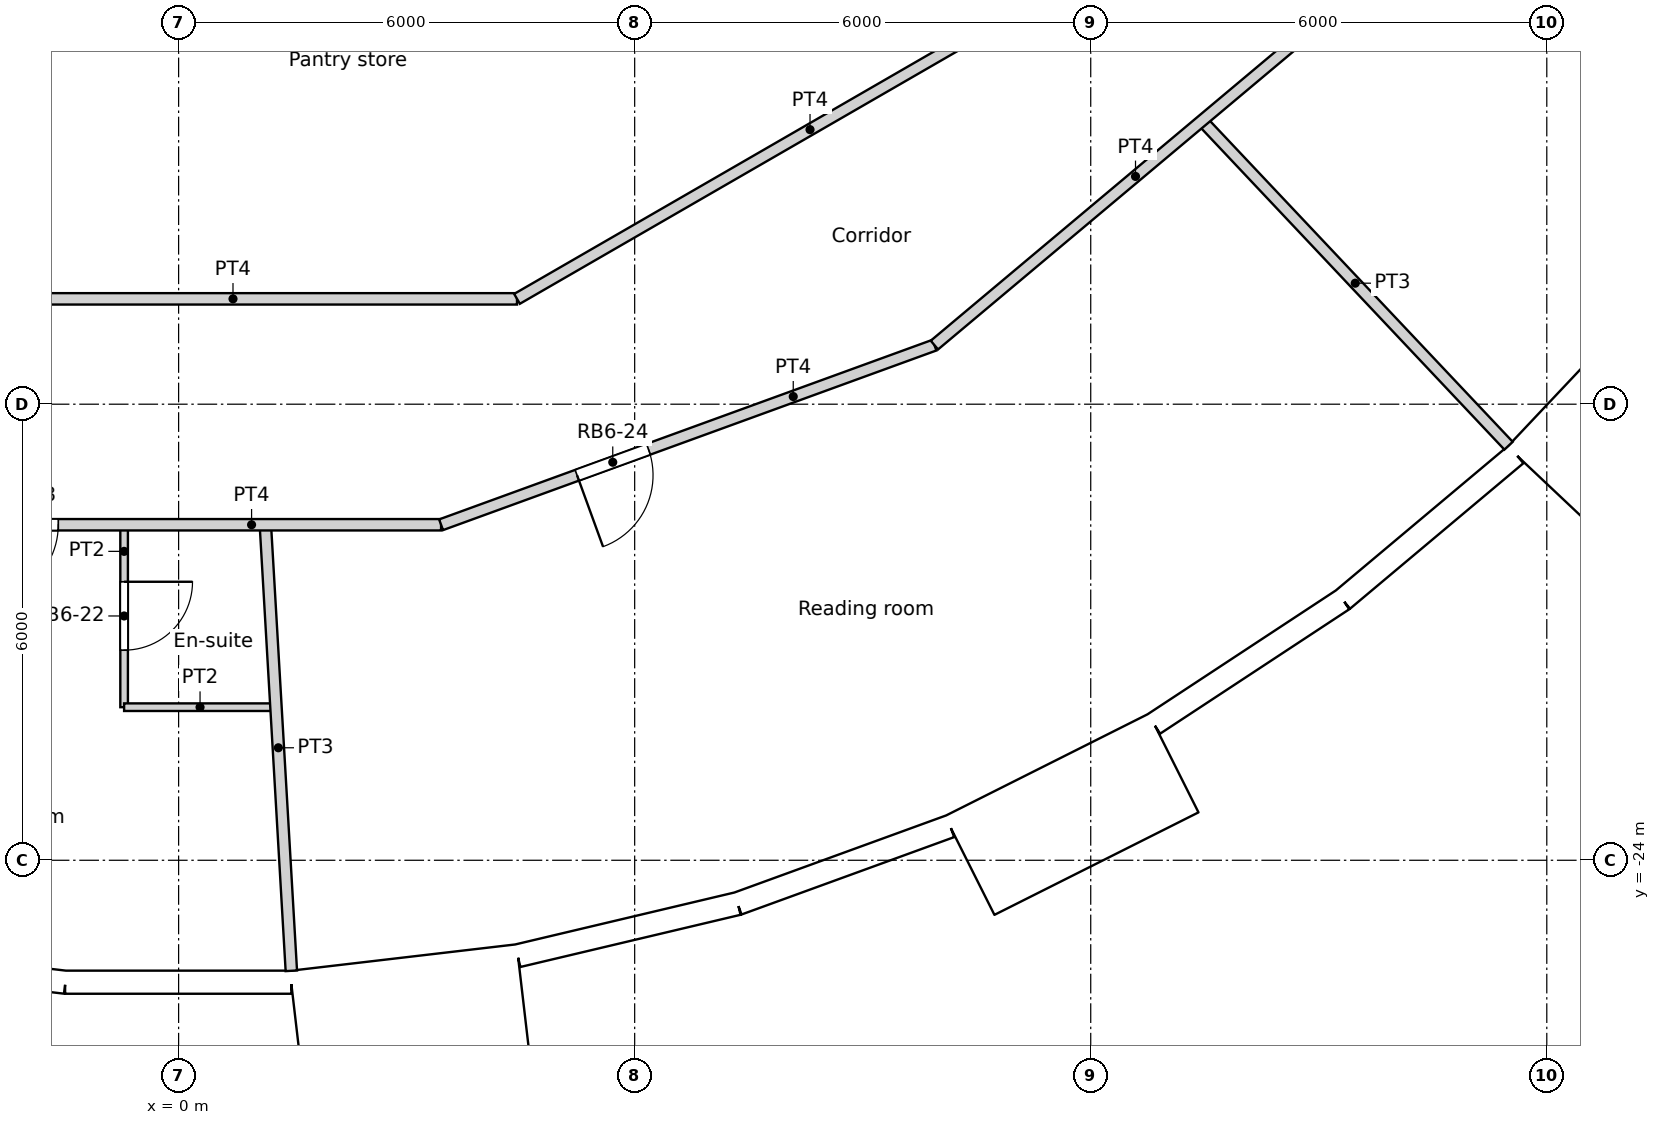
"""IFC4 building model, lengths in metres.
Left out: names, types, materials, properties, quantities, classifications, styles, units other than length and angle.
Written with IfcOpenShell. Run it as: python <this file> out.ifc"""

import sys

from ifc_helpers import new_model, si_unit, direction, frame, frame_2d, origin, origin_2d, place, context, subcontext, project, spatial, rectangle, circle, extrude, element, fill, save


model = new_model("IFC4")
c1 = context("Model", 3, precision=1e-05, world=origin(), true_north=direction((0.0, 1.0)))
c2 = subcontext(c1, "Body", "Model", "MODEL_VIEW")
j1 = project(units=[si_unit("LENGTHUNIT", "METRE"), si_unit("PLANEANGLEUNIT", "RADIAN")], contexts=[c1])
p1 = place(None, origin())
s1 = spatial("IfcSite", under=j1, at=p1, CompositionType="ELEMENT")
p2 = place(p1, origin())
s2 = spatial("IfcBuilding", under=s1, at=p2, CompositionType="ELEMENT")
p3 = place(p2, frame((0.0, 0.0, 180.0)))
s3 = spatial("IfcBuildingStorey", under=s2, at=p3, CompositionType="ELEMENT", Elevation=180.0)
for number, where, z_axis, x_axis in (
    (1, (-1.427, -24.506, 0.0), (0.0, 0.0, 1.0), (1.0, 0.0, 0.0)),
    (2, (4.263, -24.175, 0.0), (0.0, 0.0, 1.0), (1.0, 0.0, 0.0)),
    (3, (9.723, -22.54, 0.0), (0.0, 0.0, 1.0), (1.0, 0.0, 0.0)),
    (4, (14.659, -19.69, 0.0), (0.0, 0.0, 1.0), (1.0, 0.0, 0.0)),
    (5, (18.805, -15.779, 0.0), (0.0, 0.0, 1.0), (1.0, 0.0, 0.0)),
):
    element("IfcColumn", number, at=place(p3, frame(where, z_axis=z_axis, x_axis=x_axis)), inside=s3, PredefinedType="COLUMN", context=c2, shape_type="SweptSolid", body=[
        extrude(circle(Radius=0.6, at=origin_2d()), origin(), (0.0, 0.0, 1.0), 3.6),
    ])
for number, where, z_axis, x_axis in (
    (6, (1.406, -18.77, 0.0), (0.0, 0.0, 1.0), (1.0, 0.0, 0.0)),
    (7, (6.876, -17.521, 0.0), (0.0, 0.0, 1.0), (1.0, 0.0, 0.0)),
    (8, (11.735, -14.716, 0.0), (0.0, 0.0, 1.0), (1.0, 0.0, 0.0)),
):
    element("IfcColumn", number, at=place(p3, frame(where, z_axis=z_axis, x_axis=x_axis)), inside=s3, PredefinedType="COLUMN", context=c2, shape_type="SweptSolid", body=[
        extrude(circle(Radius=0.65, at=origin_2d()), origin(), (0.0, 0.0, 1.0), 3.6),
    ])
p4 = place(p3, frame((-4.444, -25.259, 0.0), z_axis=(0.0, 0.0, 1.0), x_axis=(0.993245010522, -0.1160359818, 0.0)))
e9 = element("IfcWall", 9, at=p4, inside=s3, PredefinedType="SOLIDWALL", context=c2, shape_type="SweptSolid", body=[
    extrude(rectangle(XDim=2.973, YDim=0.3, at=frame_2d((1.486, 0.0))), origin(), (0.0, 0.0, 1.0), 3.3),
])
p5 = place(p4, frame((1.486, 0.0, 1.55)))
e10 = element("IfcOpeningElement", 10, at=p5, cuts=e9, PredefinedType="OPENING", context=c2, shape_type="SweptSolid", body=[
    extrude(circle(Radius=0.9, at=origin_2d()), frame((0.0, 0.16, 0.0), z_axis=(0.0, -1.0, 0.0), x_axis=(1.0, 0.0, 0.0)), (0.0, 0.0, 1.0), 0.32),
])
p6 = place(p3, frame((-1.491, -25.604, 0.0), z_axis=(0.0, 0.0, 1.0), x_axis=(1.0, 0.0, 0.0)))
e11 = element("IfcWall", 11, at=p6, inside=s3, PredefinedType="SOLIDWALL", context=c2, shape_type="SweptSolid", body=[
    extrude(rectangle(XDim=2.973, YDim=0.3, at=frame_2d((1.486, 0.0))), origin(), (0.0, 0.0, 1.0), 3.3),
])
p7 = place(p6, frame((1.486, 0.0, 1.55)))
e12 = element("IfcOpeningElement", 12, at=p7, cuts=e11, PredefinedType="OPENING", context=c2, shape_type="SweptSolid", body=[
    extrude(circle(Radius=0.9, at=origin_2d()), frame((0.0, 0.16, 0.0), z_axis=(0.0, -1.0, 0.0), x_axis=(1.0, 0.0, 0.0)), (0.0, 0.0, 1.0), 0.32),
])
p8 = place(p3, frame((1.549, -26.176, -0.3), z_axis=(0.0, 0.0, 1.0), x_axis=(0.9932342274, 0.116128246006, 0.0)))
e13 = element("IfcWall", 13, at=p8, inside=s3, PredefinedType="ELEMENTEDWALL", context=c2, shape_type="SweptSolid", body=[
    extrude(rectangle(XDim=3.0, YDim=1.45, at=frame_2d((1.5, 0.0))), origin(), (0.0, 0.0, 1.0), 3.6),
])
p9 = place(p8, frame((1.5, 0.0, 1.85)))
e14 = element("IfcOpeningElement", 14, at=p9, cuts=e13, PredefinedType="OPENING", context=c2, shape_type="SweptSolid", body=[
    extrude(circle(Radius=0.9, at=origin_2d()), frame((0.0, 0.735, 0.0), z_axis=(0.0, -1.0, 0.0), x_axis=(1.0, 0.0, 0.0)), (0.0, 0.0, 1.0), 1.47),
])
p10 = place(p3, frame((4.463, -25.256, 0.0), z_axis=(0.0, 0.0, 1.0), x_axis=(0.973045378923, 0.230613725862, 0.0)))
e15 = element("IfcWall", 15, at=p10, inside=s3, PredefinedType="SOLIDWALL", context=c2, shape_type="SweptSolid", body=[
    extrude(rectangle(XDim=2.973, YDim=0.3, at=frame_2d((1.486, 0.0))), origin(), (0.0, 0.0, 1.0), 3.3),
])
p11 = place(p10, frame((1.486, 0.0, 1.55)))
e16 = element("IfcOpeningElement", 16, at=p11, cuts=e15, PredefinedType="OPENING", context=c2, shape_type="SweptSolid", body=[
    extrude(circle(Radius=0.9, at=origin_2d()), frame((0.0, 0.16, 0.0), z_axis=(0.0, -1.0, 0.0), x_axis=(1.0, 0.0, 0.0)), (0.0, 0.0, 1.0), 0.32),
])
p12 = place(p3, frame((7.356, -24.57, 0.0), z_axis=(0.0, 0.0, 1.0), x_axis=(0.939690282133, 0.342026568652, 0.0)))
e17 = element("IfcWall", 17, at=p12, inside=s3, PredefinedType="SOLIDWALL", context=c2, shape_type="SweptSolid", body=[
    extrude(rectangle(XDim=2.973, YDim=0.3, at=frame_2d((1.486, 0.0))), origin(), (0.0, 0.0, 1.0), 3.3),
])
p13 = place(p12, frame((1.486, 0.0, 1.55)))
e18 = element("IfcOpeningElement", 18, at=p13, cuts=e17, PredefinedType="OPENING", context=c2, shape_type="SweptSolid", body=[
    extrude(circle(Radius=0.9, at=origin_2d()), frame((0.0, 0.16, 0.0), z_axis=(0.0, -1.0, 0.0), x_axis=(1.0, 0.0, 0.0)), (0.0, 0.0, 1.0), 0.32),
])
p14 = place(p3, frame((10.409, -24.068, -0.3), z_axis=(0.0, 0.0, 1.0), x_axis=(0.893628249713, 0.448807922518, 0.0)))
e19 = element("IfcWall", 19, at=p14, inside=s3, PredefinedType="ELEMENTEDWALL", context=c2, shape_type="SweptSolid", body=[
    extrude(rectangle(XDim=3.0, YDim=1.45, at=frame_2d((1.5, 0.0))), origin(), (0.0, 0.0, 1.0), 3.6),
])
p15 = place(p14, frame((1.5, 0.0, 1.85)))
e20 = element("IfcOpeningElement", 20, at=p15, cuts=e19, PredefinedType="OPENING", context=c2, shape_type="SweptSolid", body=[
    extrude(circle(Radius=0.9, at=origin_2d()), frame((0.0, 0.735, 0.0), z_axis=(0.0, -1.0, 0.0), x_axis=(1.0, 0.0, 0.0)), (0.0, 0.0, 1.0), 1.47),
])
p16 = place(p3, frame((12.832, -22.206, 0.0), z_axis=(0.0, 0.0, 1.0), x_axis=(0.835508361394, 0.54947773207, 0.0)))
e21 = element("IfcWall", 21, at=p16, inside=s3, PredefinedType="SOLIDWALL", context=c2, shape_type="SweptSolid", body=[
    extrude(rectangle(XDim=2.973, YDim=0.3, at=frame_2d((1.486, 0.0))), origin(), (0.0, 0.0, 1.0), 3.3),
])
p17 = place(p16, frame((1.486, 0.0, 1.55)))
e22 = element("IfcOpeningElement", 22, at=p17, cuts=e21, PredefinedType="OPENING", context=c2, shape_type="SweptSolid", body=[
    extrude(circle(Radius=0.9, at=origin_2d()), frame((0.0, 0.16, 0.0), z_axis=(0.0, -1.0, 0.0), x_axis=(1.0, 0.0, 0.0)), (0.0, 0.0, 1.0), 0.32),
])
p18 = place(p3, frame((15.316, -20.573, 0.0), z_axis=(0.0, 0.0, 1.0), x_axis=(0.766008913364, 0.642829950023, 0.0)))
e23 = element("IfcWall", 23, at=p18, inside=s3, PredefinedType="SOLIDWALL", context=c2, shape_type="SweptSolid", body=[
    extrude(rectangle(XDim=2.973, YDim=0.3, at=frame_2d((1.486, 0.0))), origin(), (0.0, 0.0, 1.0), 3.3),
])
p19 = place(p18, frame((1.486, 0.0, 1.55)))
e24 = element("IfcOpeningElement", 24, at=p19, cuts=e23, PredefinedType="OPENING", context=c2, shape_type="SweptSolid", body=[
    extrude(circle(Radius=0.9, at=origin_2d()), frame((0.0, 0.16, 0.0), z_axis=(0.0, -1.0, 0.0), x_axis=(1.0, 0.0, 0.0)), (0.0, 0.0, 1.0), 0.32),
])
p20 = place(p3, frame((18.013, -19.056, -0.3), z_axis=(0.0, 0.0, 1.0), x_axis=(0.686217177108, 0.727396718334, 0.0)))
e25 = element("IfcWall", 25, at=p20, inside=s3, PredefinedType="ELEMENTEDWALL", context=c2, shape_type="SweptSolid", body=[
    extrude(rectangle(XDim=3.0, YDim=1.45, at=frame_2d((1.5, 0.0))), origin(), (0.0, 0.0, 1.0), 3.6),
])
p21 = place(p20, frame((1.5, 0.0, 1.85)))
e26 = element("IfcOpeningElement", 26, at=p21, cuts=e25, PredefinedType="OPENING", context=c2, shape_type="SweptSolid", body=[
    extrude(circle(Radius=0.9, at=origin_2d()), frame((0.0, 0.735, 0.0), z_axis=(0.0, -1.0, 0.0), x_axis=(1.0, 0.0, 0.0)), (0.0, 0.0, 1.0), 1.47),
])
p22 = place(p3, frame((9.943, -17.222, 0.0), z_axis=(0.0, 0.0, 1.0), x_axis=(0.766192104565, 0.642611592567, 0.0)))
e27 = element("IfcWall", 27, at=p22, inside=s3, PredefinedType="PARTITIONING", context=c2, shape_type="SweptSolid", body=[
    extrude(rectangle(XDim=6.906, YDim=0.15, at=frame_2d((3.453, 0.0))), origin(), (0.0, 0.0, 1.0), 3.3),
])
p23 = place(p3, frame((-3.021, -16.614, 0.0), z_axis=(0.0, 0.0, 1.0), x_axis=(1.0, 0.0, 0.0)))
e28 = element("IfcWall", 28, at=p23, inside=s3, PredefinedType="PARTITIONING", context=c2, shape_type="SweptSolid", body=[
    extrude(rectangle(XDim=7.473, YDim=0.15, at=frame_2d((3.736, 0.0))), origin(), (0.0, 0.0, 1.0), 3.3),
])
p24 = place(p3, frame((4.452, -16.614, 0.0), z_axis=(0.0, 0.0, 1.0), x_axis=(0.866005203721, 0.500034985904, 0.0)))
e29 = element("IfcWall", 29, at=p24, inside=s3, PredefinedType="PARTITIONING", context=c2, shape_type="SweptSolid", body=[
    extrude(rectangle(XDim=8.903, YDim=0.15, at=frame_2d((4.452, 0.0))), origin(), (0.0, 0.0, 1.0), 3.3),
])
p25 = place(p3, frame((-3.453, -19.586, 0.0), z_axis=(0.0, 0.0, 1.0), x_axis=(1.0, 0.0, 0.0)))
e30 = element("IfcWall", 30, at=p25, inside=s3, PredefinedType="PARTITIONING", context=c2, shape_type="SweptSolid", body=[
    extrude(rectangle(XDim=6.906, YDim=0.15, at=frame_2d((3.453, 0.0))), origin(), (0.0, 0.0, 1.0), 3.3),
])
p26 = place(p25, frame((0.87, 0.0, 0.0)))
e31 = element("IfcOpeningElement", 31, at=p26, cuts=e30, PredefinedType="OPENING", context=c2, shape_type="SweptSolid", body=[
    extrude(rectangle(XDim=1.0, YDim=2.1, at=frame_2d((0.5, 1.05))), frame((0.0, 0.075, 0.0), z_axis=(0.0, -1.0, 0.0), x_axis=(1.0, 0.0, 0.0)), (0.0, 0.0, 1.0), 0.15),
])
p27 = place(p3, frame((3.453, -19.586, 0.0), z_axis=(0.0, 0.0, 1.0), x_axis=(0.939672634566, 0.342075050021, 0.0)))
e32 = element("IfcWall", 32, at=p27, inside=s3, PredefinedType="PARTITIONING", context=c2, shape_type="SweptSolid", body=[
    extrude(rectangle(XDim=6.908, YDim=0.15, at=frame_2d((3.454, 0.0))), origin(), (0.0, 0.0, 1.0), 3.3),
])
p28 = place(p27, frame((1.904, 0.0, 0.0)))
e33 = element("IfcOpeningElement", 33, at=p28, cuts=e32, PredefinedType="OPENING", context=c2, shape_type="SweptSolid", body=[
    extrude(rectangle(XDim=1.0, YDim=2.04, at=frame_2d((0.5, 1.02))), frame((0.0, 0.075, 0.0), z_axis=(0.0, -1.0, 0.0), x_axis=(1.0, 0.0, 0.0)), (0.0, 0.0, 1.0), 0.15),
])
p29 = place(p3, frame((-0.717, -21.986, 0.0), z_axis=(0.0, 0.0, 1.0), x_axis=(0.0, 1.0, 0.0)))
e34 = element("IfcWall", 34, at=p29, inside=s3, PredefinedType="PARTITIONING", context=c2, shape_type="SweptSolid", body=[
    extrude(rectangle(XDim=2.4, YDim=0.1, at=frame_2d((1.2, 0.0))), origin(), (0.0, 0.0, 1.0), 3.3),
])
p30 = place(p29, frame((0.75, 0.0, 0.0)))
e35 = element("IfcOpeningElement", 35, at=p30, cuts=e34, PredefinedType="OPENING", context=c2, shape_type="SweptSolid", body=[
    extrude(rectangle(XDim=0.9, YDim=2.04, at=frame_2d((0.45, 1.02))), frame((0.0, 0.05, 0.0), z_axis=(0.0, -1.0, 0.0), x_axis=(1.0, 0.0, 0.0)), (0.0, 0.0, 1.0), 0.1),
])
p31 = place(p3, frame((-0.717, -21.986, 0.0), z_axis=(0.0, 0.0, 1.0), x_axis=(1.0, 0.0, 0.0)))
e36 = element("IfcWall", 36, at=p31, inside=s3, PredefinedType="PARTITIONING", context=c2, shape_type="SweptSolid", body=[
    extrude(rectangle(XDim=1.998, YDim=0.1, at=frame_2d((0.999, 0.0))), origin(), (0.0, 0.0, 1.0), 3.3),
])
p32 = place(p3, frame((1.141, -19.586, 0.0), z_axis=(0.0, 0.0, 1.0), x_axis=(0.058147412668, -0.998308007781, 0.0)))
e37 = element("IfcWall", 37, at=p32, inside=s3, PredefinedType="PARTITIONING", context=c2, shape_type="SweptSolid", body=[
    extrude(rectangle(XDim=5.878, YDim=0.15, at=frame_2d((2.939, 0.0))), origin(), (0.0, 0.0, 1.0), 3.3),
])
p33 = place(p3, frame((13.463, -14.27, 0.0), z_axis=(0.0, 0.0, 1.0), x_axis=(0.6862502776, -0.72736549031, 0.0)))
e38 = element("IfcWall", 38, at=p33, inside=s3, PredefinedType="PARTITIONING", context=c2, shape_type="SweptSolid", body=[
    extrude(rectangle(XDim=5.879, YDim=0.15, at=frame_2d((2.939, 0.0))), origin(), (0.0, 0.0, 1.0), 3.3),
])
p34 = place(p7, origin())
e39 = element("IfcWindow", 39, at=p34, inside=s3, PartitioningType="SINGLE_PANEL", PredefinedType="WINDOW", context=c2, shape_type="SweptSolid", body=[
    extrude(circle(Radius=0.9, at=origin_2d()), frame((0.0, 0.12, 0.0), z_axis=(0.0, -1.0, 0.0), x_axis=(1.0, 0.0, 0.0)), (0.0, 0.0, 1.0), 0.1),
])
fill(e12, e39)
p35 = place(p9, origin())
e40 = element("IfcWindow", 40, at=p35, inside=s3, PartitioningType="SINGLE_PANEL", PredefinedType="WINDOW", context=c2, shape_type="SweptSolid", body=[
    extrude(circle(Radius=0.9, at=origin_2d()), frame((0.0, 0.695, 0.0), z_axis=(0.0, -1.0, 0.0), x_axis=(1.0, 0.0, 0.0)), (0.0, 0.0, 1.0), 0.1),
])
fill(e14, e40)
p36 = place(p11, origin())
e41 = element("IfcWindow", 41, at=p36, inside=s3, PartitioningType="SINGLE_PANEL", PredefinedType="WINDOW", context=c2, shape_type="SweptSolid", body=[
    extrude(circle(Radius=0.9, at=origin_2d()), frame((0.0, 0.12, 0.0), z_axis=(0.0, -1.0, 0.0), x_axis=(1.0, 0.0, 0.0)), (0.0, 0.0, 1.0), 0.1),
])
fill(e16, e41)
p37 = place(p13, origin())
e42 = element("IfcWindow", 42, at=p37, inside=s3, PartitioningType="SINGLE_PANEL", PredefinedType="WINDOW", context=c2, shape_type="SweptSolid", body=[
    extrude(circle(Radius=0.9, at=origin_2d()), frame((0.0, 0.12, 0.0), z_axis=(0.0, -1.0, 0.0), x_axis=(1.0, 0.0, 0.0)), (0.0, 0.0, 1.0), 0.1),
])
fill(e18, e42)
p38 = place(p15, origin())
e43 = element("IfcWindow", 43, at=p38, inside=s3, PartitioningType="SINGLE_PANEL", PredefinedType="WINDOW", context=c2, shape_type="SweptSolid", body=[
    extrude(circle(Radius=0.9, at=origin_2d()), frame((0.0, 0.695, 0.0), z_axis=(0.0, -1.0, 0.0), x_axis=(1.0, 0.0, 0.0)), (0.0, 0.0, 1.0), 0.1),
])
fill(e20, e43)
p39 = place(p17, origin())
e44 = element("IfcWindow", 44, at=p39, inside=s3, PartitioningType="SINGLE_PANEL", PredefinedType="WINDOW", context=c2, shape_type="SweptSolid", body=[
    extrude(circle(Radius=0.9, at=origin_2d()), frame((0.0, 0.12, 0.0), z_axis=(0.0, -1.0, 0.0), x_axis=(1.0, 0.0, 0.0)), (0.0, 0.0, 1.0), 0.1),
])
fill(e22, e44)
p40 = place(p19, origin())
e45 = element("IfcWindow", 45, at=p40, inside=s3, PartitioningType="SINGLE_PANEL", PredefinedType="WINDOW", context=c2, shape_type="SweptSolid", body=[
    extrude(circle(Radius=0.9, at=origin_2d()), frame((0.0, 0.12, 0.0), z_axis=(0.0, -1.0, 0.0), x_axis=(1.0, 0.0, 0.0)), (0.0, 0.0, 1.0), 0.1),
])
fill(e24, e45)
p41 = place(p21, origin())
e46 = element("IfcWindow", 46, at=p41, inside=s3, PartitioningType="SINGLE_PANEL", PredefinedType="WINDOW", context=c2, shape_type="SweptSolid", body=[
    extrude(circle(Radius=0.9, at=origin_2d()), frame((0.0, 0.695, 0.0), z_axis=(0.0, -1.0, 0.0), x_axis=(1.0, 0.0, 0.0)), (0.0, 0.0, 1.0), 0.1),
])
fill(e26, e46)
p42 = place(p30, origin())
e47 = element("IfcDoor", 47, at=p42, inside=s3, OperationType="SINGLE_SWING_LEFT", PredefinedType="DOOR", context=c2, shape_type="SweptSolid", body=[
    extrude(rectangle(XDim=0.9, YDim=2.04, at=frame_2d((0.45, 1.02))), frame((0.0, 0.025, 0.0), z_axis=(0.0, -1.0, 0.0), x_axis=(1.0, 0.0, 0.0)), (0.0, 0.0, 1.0), 0.05),
])
fill(e35, e47)
p43 = place(p26, origin())
e48 = element("IfcDoor", 48, at=p43, inside=s3, OperationType="SINGLE_SWING_RIGHT", PredefinedType="DOOR", context=c2, shape_type="SweptSolid", body=[
    extrude(rectangle(XDim=1.0, YDim=2.1, at=frame_2d((0.5, 1.05))), frame((0.0, 0.025, 0.0), z_axis=(0.0, -1.0, 0.0), x_axis=(1.0, 0.0, 0.0)), (0.0, 0.0, 1.0), 0.05),
])
fill(e31, e48)
p44 = place(p28, origin())
e49 = element("IfcDoor", 49, at=p44, inside=s3, OperationType="SINGLE_SWING_RIGHT", PredefinedType="DOOR", context=c2, shape_type="SweptSolid", body=[
    extrude(rectangle(XDim=1.0, YDim=2.04, at=frame_2d((0.5, 1.02))), frame((0.0, 0.025, 0.0), z_axis=(0.0, -1.0, 0.0), x_axis=(1.0, 0.0, 0.0)), (0.0, 0.0, 1.0), 0.05),
])
fill(e33, e49)
save(model, sys.argv[1])
